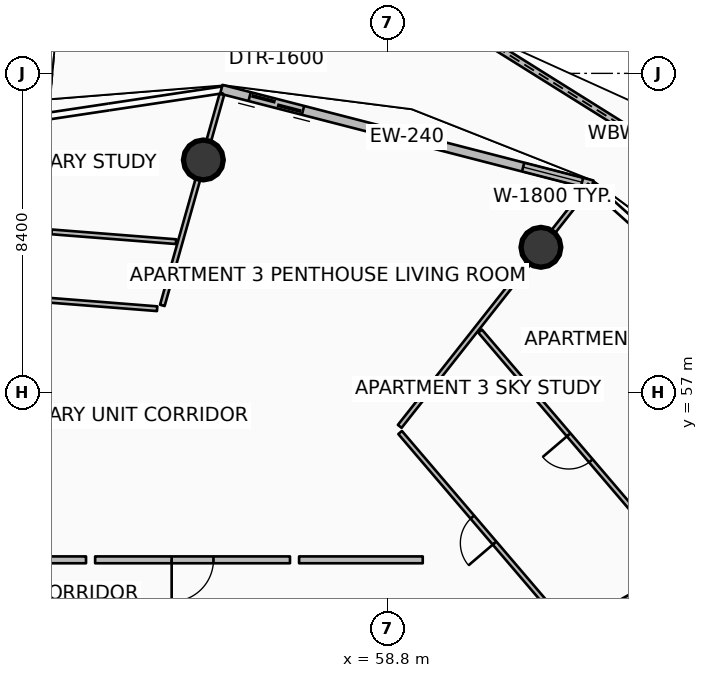
"""IFC4 building model, lengths in metres.
Left out: names, types, materials, properties, quantities, classifications, styles, units other than length and angle.
Written with IfcOpenShell. Run it as: python <this file> out.ifc"""

import sys

from ifc_helpers import new_model, si_unit, direction, frame, frame_2d, origin, origin_2d, place, context, subcontext, project, spatial, polyline, rectangle, circle, outline, extrude, element, fill, save


model = new_model("IFC4")
c1 = context("Model", 3, precision=1e-05, world=origin(), true_north=direction((0.0, 1.0)))
c2 = subcontext(c1, "Body", "Model", "MODEL_VIEW")
j1 = project(units=[si_unit("LENGTHUNIT", "METRE"), si_unit("PLANEANGLEUNIT", "RADIAN")], contexts=[c1])
p1 = place(None, origin())
s1 = spatial("IfcSite", under=j1, at=p1, CompositionType="ELEMENT")
p2 = place(p1, origin())
s2 = spatial("IfcBuilding", under=s1, at=p2, CompositionType="ELEMENT")
p3 = place(p2, frame((0.0, 0.0, 161.55)))
s3 = spatial("IfcBuildingStorey", under=s2, at=p3, CompositionType="ELEMENT", Elevation=161.55)
for number, where, z_axis, x_axis in (
    (1, (62.84, 60.824, 0.0), (0.0, 0.0, 1.0), (1.0, 0.0, 0.0)),
    (2, (53.957, 63.122, 0.0), (0.0, 0.0, 1.0), (1.0, 0.0, 0.0)),
):
    element("IfcColumn", number, at=place(p3, frame(where, z_axis=z_axis, x_axis=x_axis)), inside=s3, PredefinedType="COLUMN", context=c2, shape_type="SweptSolid", body=[
        extrude(circle(Radius=0.525, at=origin_2d()), origin(), (0.0, 0.0, 1.0), 3.5),
    ])
p4 = place(p3, frame((69.904, 60.94, 0.0), z_axis=(0.0, 0.0, 1.0), x_axis=(-0.847688171498, 0.53049482929, 0.0)))
e3 = element("IfcWall", 3, at=p4, inside=s3, PredefinedType="PARAPET", context=c2, shape_type="SweptSolid", body=[
    extrude(outline(polyline([(0.0, 0.0), (10.84, 0.0), (10.84, 1.832), (5.42, 1.696), (0.0, 1.497), (0.0, 0.0)])), frame((0.0, 0.09, 0.0), z_axis=(0.0, -1.0, 0.0), x_axis=(1.0, 0.0, 0.0)), (0.0, 0.0, 1.0), 0.18),
])
p5 = place(p3, frame((64.192, 62.466, 0.0), z_axis=(0.0, 0.0, 1.0), x_axis=(-0.968379685126, 0.249481032214, 0.0)))
e4 = element("IfcWall", 4, at=p5, inside=s3, PredefinedType="SOLIDWALL", context=c2, shape_type="SweptSolid", body=[
    extrude(rectangle(XDim=10.082, YDim=0.24, at=frame_2d((5.041, 0.0))), origin(), (0.0, 0.0, 1.0), 2.45),
])
p6 = place(p5, frame((7.862, 0.0, 0.0)))
e5 = element("IfcOpeningElement", 5, at=p6, cuts=e4, PredefinedType="OPENING", context=c2, shape_type="SweptSolid", body=[
    extrude(rectangle(XDim=1.45, YDim=2.15, at=frame_2d((0.725, 1.075))), frame((0.0, 0.13, 0.0), z_axis=(0.0, -1.0, 0.0), x_axis=(1.0, 0.0, 0.0)), (0.0, 0.0, 1.0), 0.26),
])
p7 = place(p5, frame((0.28, 0.0, 0.65)))
e6 = element("IfcOpeningElement", 6, at=p7, cuts=e4, PredefinedType="OPENING", context=c2, shape_type="SweptSolid", body=[
    extrude(rectangle(XDim=1.6, YDim=1.5, at=frame_2d((0.8, 0.75))), frame((0.0, 0.13, 0.0), z_axis=(0.0, -1.0, 0.0), x_axis=(1.0, 0.0, 0.0)), (0.0, 0.0, 1.0), 0.26),
])
p8 = place(p3, frame((56.236, 52.6, 0.0), z_axis=(0.0, 0.0, 1.0), x_axis=(-1.0, 0.0, 0.0)))
e7 = element("IfcWall", 7, at=p8, inside=s3, PredefinedType="PARTITIONING", context=c2, shape_type="SweptSolid", body=[
    extrude(rectangle(XDim=5.127, YDim=0.18, at=frame_2d((2.563, 0.0))), origin(), (0.0, 0.0, 1.0), 2.94),
])
p9 = place(p8, frame((2.013, 0.0, 0.0)))
e8 = element("IfcOpeningElement", 8, at=p9, cuts=e7, PredefinedType="OPENING", context=c2, shape_type="SweptSolid", body=[
    extrude(rectangle(XDim=1.1, YDim=2.1, at=frame_2d((0.55, 1.05))), frame((0.0, 0.1, 0.0), z_axis=(0.0, -1.0, 0.0), x_axis=(1.0, 0.0, 0.0)), (0.0, 0.0, 1.0), 0.2),
])
p10 = place(p3, frame((59.73, 52.6, 0.0), z_axis=(0.0, 0.0, 1.0), x_axis=(-1.0, 0.0, 0.0)))
e9 = element("IfcWall", 9, at=p10, inside=s3, PredefinedType="PARTITIONING", context=c2, shape_type="SweptSolid", body=[
    extrude(rectangle(XDim=3.254, YDim=0.18, at=frame_2d((1.627, 0.0))), origin(), (0.0, 0.0, 1.0), 2.94),
])
p11 = place(p3, frame((63.679, 50.781, 0.0), z_axis=(0.0, 0.0, 1.0), x_axis=(0.872493265844, 0.488626136281, 0.0)))
e10 = element("IfcWall", 10, at=p11, inside=s3, PredefinedType="PARTITIONING", context=c2, shape_type="SweptSolid", body=[
    extrude(rectangle(XDim=8.816, YDim=0.125, at=frame_2d((4.408, 0.0))), origin(), (0.0, 0.0, 1.0), 2.94),
])
p12 = place(p3, frame((59.125, 56.112, 0.0), z_axis=(0.0, 0.0, 1.0), x_axis=(0.61910151414, 0.78531096719, 0.0)))
e11 = element("IfcWall", 11, at=p12, inside=s3, PredefinedType="PARTITIONING", context=c2, shape_type="SweptSolid", body=[
    extrude(rectangle(XDim=8.082, YDim=0.125, at=frame_2d((4.041, 0.0))), origin(), (0.0, 0.0, 1.0), 2.94),
])
p13 = place(p3, frame((63.52, 50.815, 0.0), z_axis=(0.0, 0.0, 1.0), x_axis=(-0.649447526186, 0.760406411553, 0.0)))
e12 = element("IfcWall", 12, at=p13, inside=s3, PredefinedType="PARTITIONING", context=c2, shape_type="SweptSolid", body=[
    extrude(rectangle(XDim=6.753, YDim=0.125, at=frame_2d((3.376, 0.0))), origin(), (0.0, 0.0, 1.0), 2.94),
])
p14 = place(p13, frame((2.926, 0.0, 0.0)))
e13 = element("IfcOpeningElement", 13, at=p14, cuts=e12, PredefinedType="OPENING", context=c2, shape_type="SweptSolid", body=[
    extrude(rectangle(XDim=0.9, YDim=2.08, at=frame_2d((0.45, 1.04))), frame((0.0, 0.073, 0.0), z_axis=(0.0, -1.0, 0.0), x_axis=(1.0, 0.0, 0.0)), (0.0, 0.0, 1.0), 0.145),
])
p15 = place(p3, frame((66.486, 52.476, 0.0), z_axis=(0.0, 0.0, 1.0), x_axis=(-0.649426515446, 0.760424355894, 0.0)))
e14 = element("IfcWall", 14, at=p15, inside=s3, PredefinedType="PARTITIONING", context=c2, shape_type="SweptSolid", body=[
    extrude(rectangle(XDim=8.079, YDim=0.125, at=frame_2d((4.04, 0.0))), origin(), (0.0, 0.0, 1.0), 2.94),
])
p16 = place(p15, frame((3.589, 0.0, 0.0)))
e15 = element("IfcOpeningElement", 15, at=p16, cuts=e14, PredefinedType="OPENING", context=c2, shape_type="SweptSolid", body=[
    extrude(rectangle(XDim=0.9, YDim=2.08, at=frame_2d((0.45, 1.04))), frame((0.0, 0.073, 0.0), z_axis=(0.0, -1.0, 0.0), x_axis=(1.0, 0.0, 0.0)), (0.0, 0.0, 1.0), 0.145),
])
p17 = place(p3, frame((50.869, 52.6, 0.0), z_axis=(0.0, 0.0, 1.0), x_axis=(-1.0, 0.0, 0.0)))
e16 = element("IfcWall", 16, at=p17, inside=s3, PredefinedType="PARTITIONING", context=c2, shape_type="SweptSolid", body=[
    extrude(rectangle(XDim=4.004, YDim=0.18, at=frame_2d((2.002, 0.0))), origin(), (0.0, 0.0, 1.0), 2.94),
])
p18 = place(p3, frame((52.878, 59.295, 0.0), z_axis=(0.0, 0.0, 1.0), x_axis=(0.271461170106, 0.962449392501, 0.0)))
e17 = element("IfcWall", 17, at=p18, inside=s3, PredefinedType="PARTITIONING", context=c2, shape_type="SweptSolid", body=[
    extrude(rectangle(XDim=5.769, YDim=0.125, at=frame_2d((2.885, 0.0))), origin(), (0.0, 0.0, 1.0), 2.94),
])
p19 = place(p3, frame((52.741, 59.208, 0.0), z_axis=(0.0, 0.0, 1.0), x_axis=(-0.996917452966, 0.078457580711, 0.0)))
e18 = element("IfcWall", 18, at=p19, inside=s3, PredefinedType="PARTITIONING", context=c2, shape_type="SweptSolid", body=[
    extrude(rectangle(XDim=6.752, YDim=0.125, at=frame_2d((3.376, 0.0))), origin(), (0.0, 0.0, 1.0), 2.94),
])
p20 = place(p19, frame((2.926, 0.0, 0.0)))
e19 = element("IfcOpeningElement", 19, at=p20, cuts=e18, PredefinedType="OPENING", context=c2, shape_type="SweptSolid", body=[
    extrude(rectangle(XDim=0.9, YDim=2.08, at=frame_2d((0.45, 1.04))), frame((0.0, 0.073, 0.0), z_axis=(0.0, -1.0, 0.0), x_axis=(1.0, 0.0, 0.0)), (0.0, 0.0, 1.0), 0.145),
])
p21 = place(p3, frame((53.239, 60.972, 0.0), z_axis=(0.0, 0.0, 1.0), x_axis=(-0.996916953075, 0.078463932292, 0.0)))
e20 = element("IfcWall", 20, at=p21, inside=s3, PredefinedType="PARTITIONING", context=c2, shape_type="SweptSolid", body=[
    extrude(rectangle(XDim=7.468, YDim=0.125, at=frame_2d((3.734, 0.0))), origin(), (0.0, 0.0, 1.0), 2.94),
])
p22 = place(p21, frame((3.284, 0.0, 0.0)))
e21 = element("IfcOpeningElement", 21, at=p22, cuts=e20, PredefinedType="OPENING", context=c2, shape_type="SweptSolid", body=[
    extrude(rectangle(XDim=0.9, YDim=2.08, at=frame_2d((0.45, 1.04))), frame((0.0, 0.073, 0.0), z_axis=(0.0, -1.0, 0.0), x_axis=(1.0, 0.0, 0.0)), (0.0, 0.0, 1.0), 0.145),
])
p23 = place(p6, origin())
e22 = element("IfcDoor", 22, at=p23, inside=s3, OperationType="DOUBLE_DOOR_SLIDING", PredefinedType="DOOR", context=c2, shape_type="SweptSolid", body=[
    extrude(rectangle(XDim=1.45, YDim=2.15, at=frame_2d((0.725, 1.075))), frame((0.0, 0.025, 0.0), z_axis=(0.0, -1.0, 0.0), x_axis=(1.0, 0.0, 0.0)), (0.0, 0.0, 1.0), 0.05),
])
fill(e5, e22)
p24 = place(p7, origin())
e23 = element("IfcWindow", 23, at=p24, inside=s3, PartitioningType="SINGLE_PANEL", PredefinedType="WINDOW", context=c2, shape_type="SweptSolid", body=[
    extrude(rectangle(XDim=1.6, YDim=1.5, at=frame_2d((0.8, 0.75))), frame((0.0, 0.03, 0.0), z_axis=(0.0, -1.0, 0.0), x_axis=(1.0, 0.0, 0.0)), (0.0, 0.0, 1.0), 0.06),
])
fill(e6, e23)
p25 = place(p9, origin())
e24 = element("IfcDoor", 24, at=p25, inside=s3, OperationType="SINGLE_SWING_RIGHT", PredefinedType="DOOR", context=c2, shape_type="SweptSolid", body=[
    extrude(rectangle(XDim=1.1, YDim=2.1, at=frame_2d((0.55, 1.05))), frame((0.0, 0.025, 0.0), z_axis=(0.0, -1.0, 0.0), x_axis=(1.0, 0.0, 0.0)), (0.0, 0.0, 1.0), 0.05),
])
fill(e8, e24)
p26 = place(p14, origin())
e25 = element("IfcDoor", 25, at=p26, inside=s3, OperationType="SINGLE_SWING_LEFT", PredefinedType="DOOR", context=c2, shape_type="SweptSolid", body=[
    extrude(rectangle(XDim=0.9, YDim=2.08, at=frame_2d((0.45, 1.04))), frame((0.0, 0.025, 0.0), z_axis=(0.0, -1.0, 0.0), x_axis=(1.0, 0.0, 0.0)), (0.0, 0.0, 1.0), 0.05),
])
fill(e13, e25)
p27 = place(p16, origin())
e26 = element("IfcDoor", 26, at=p27, inside=s3, OperationType="SINGLE_SWING_RIGHT", PredefinedType="DOOR", context=c2, shape_type="SweptSolid", body=[
    extrude(rectangle(XDim=0.9, YDim=2.08, at=frame_2d((0.45, 1.04))), frame((0.0, 0.025, 0.0), z_axis=(0.0, -1.0, 0.0), x_axis=(1.0, 0.0, 0.0)), (0.0, 0.0, 1.0), 0.05),
])
fill(e15, e26)
save(model, sys.argv[1])
